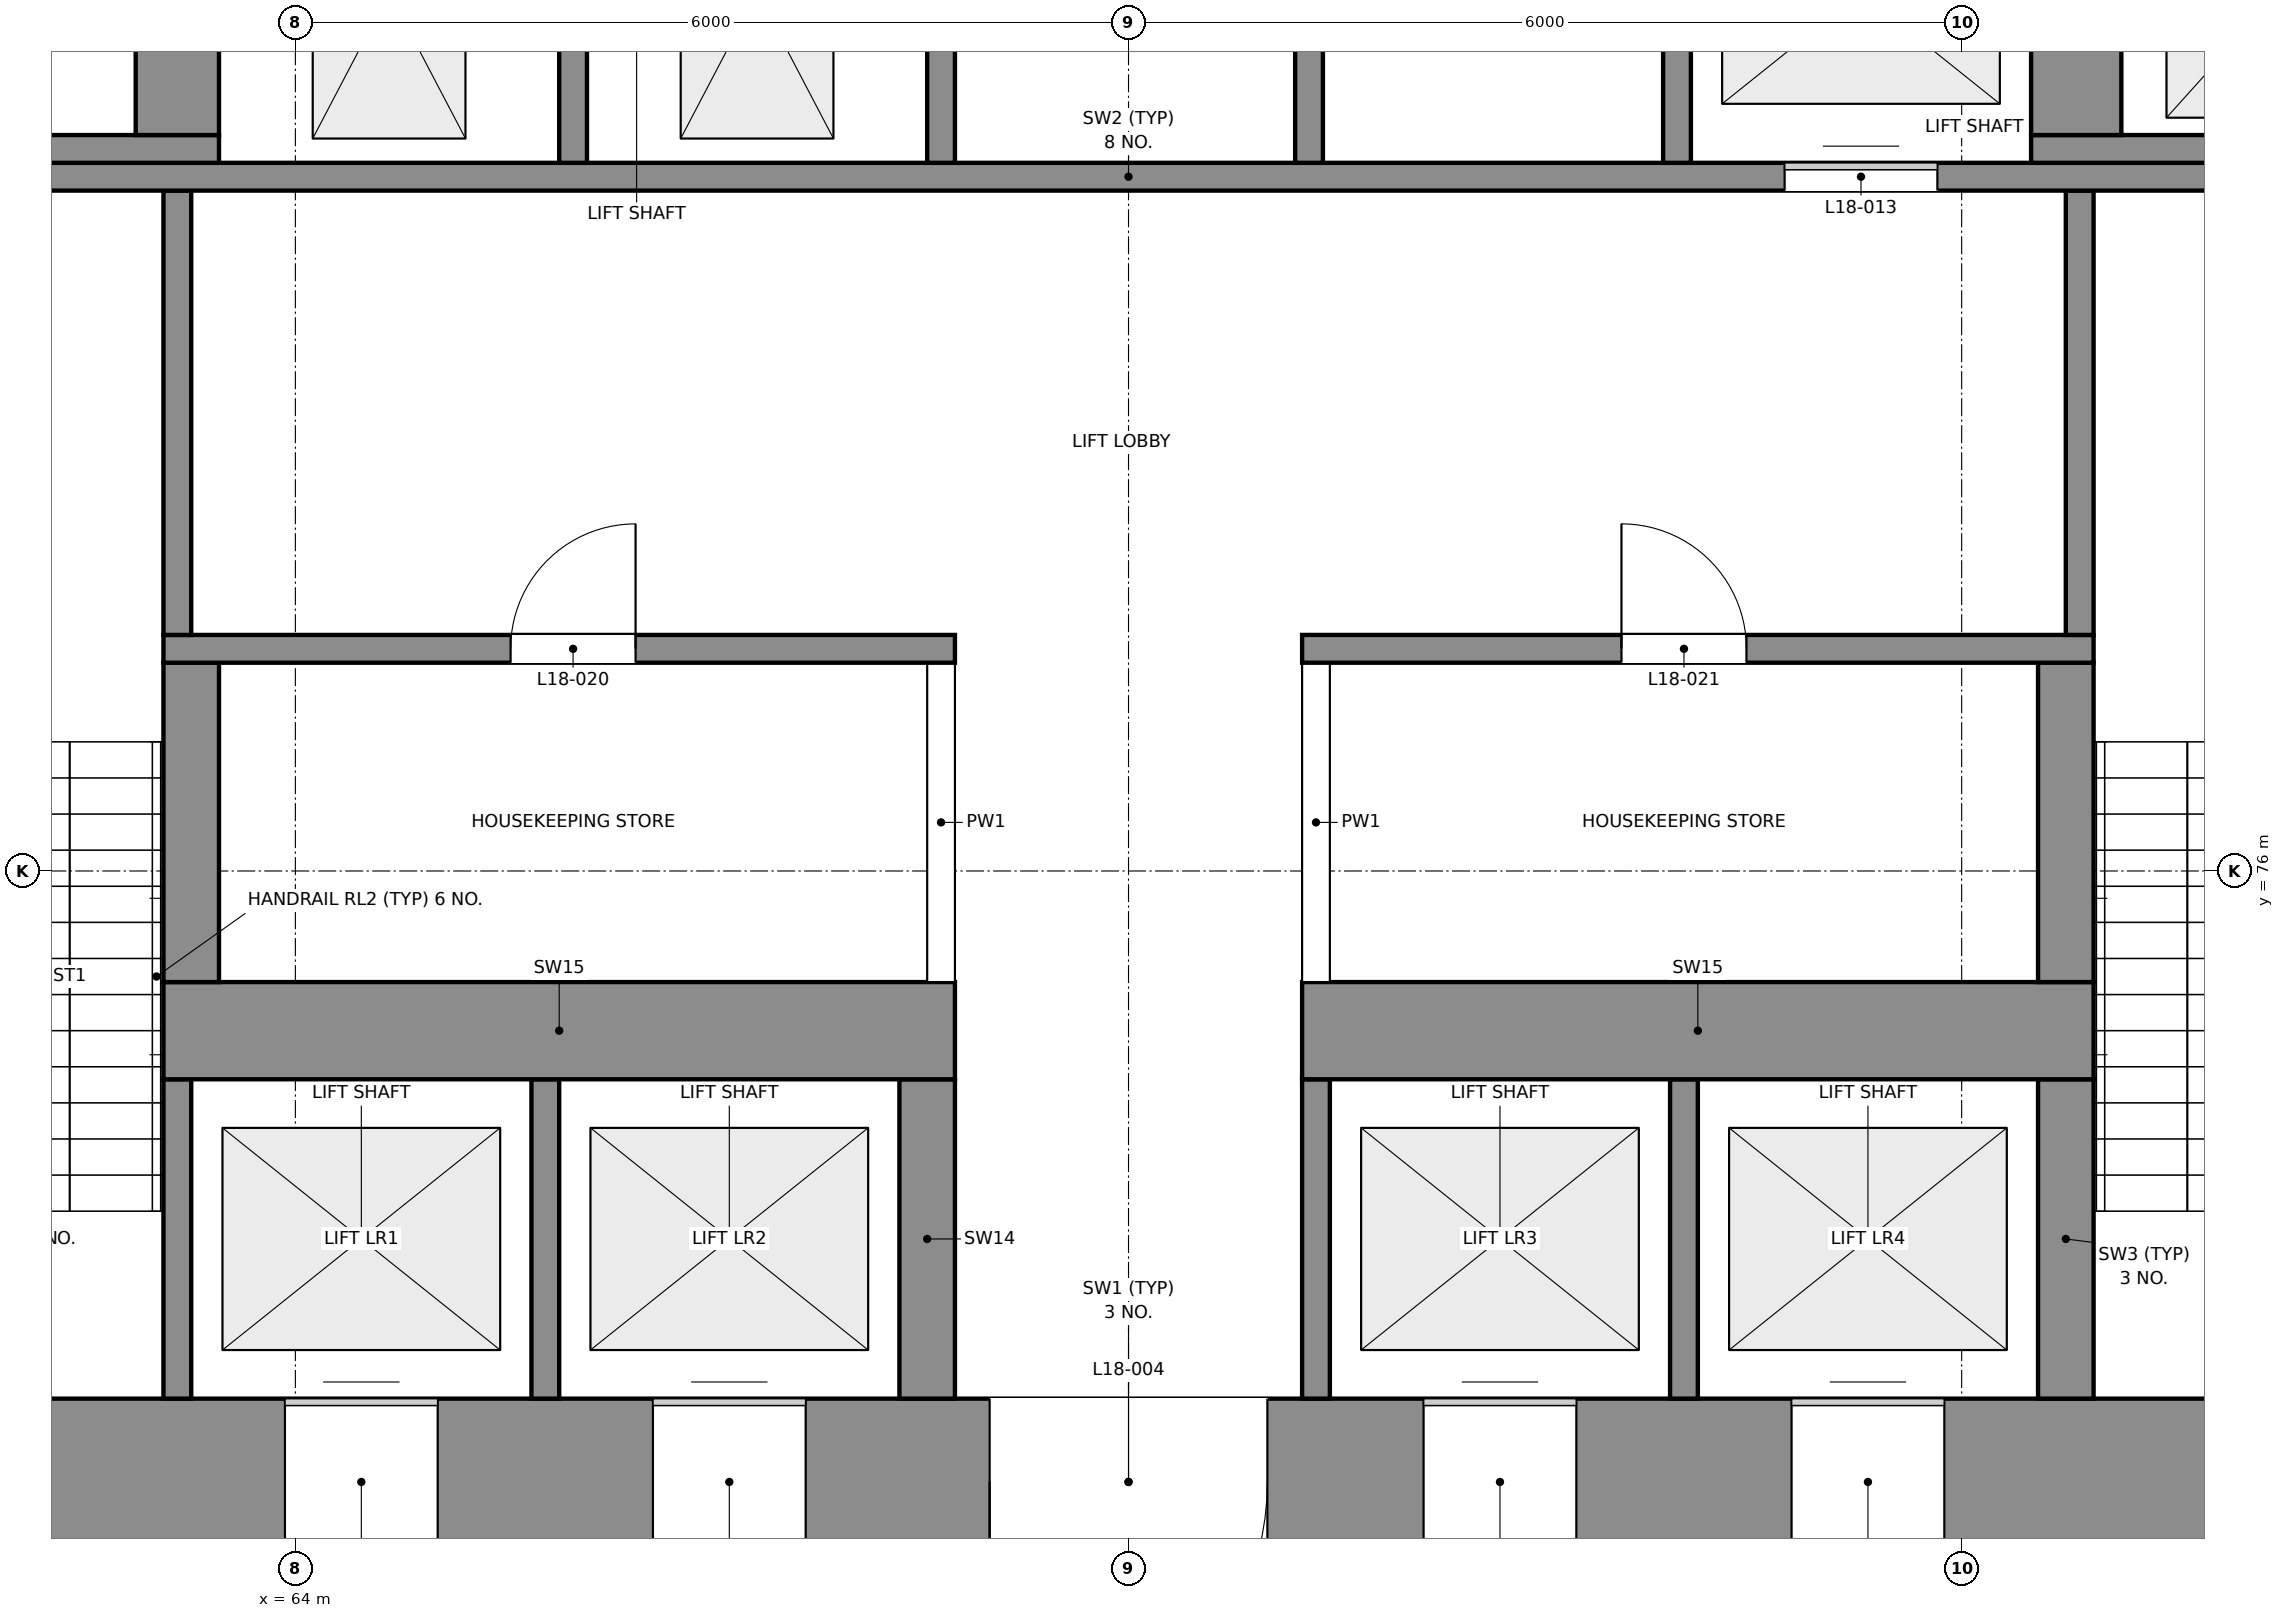
"""IFC4 building model, lengths in metres.
Left out: names, types, materials, properties, quantities, classifications, styles, units other than length and angle.
Written with IfcOpenShell. Run it as: python <this file> out.ifc"""

import sys

from ifc_helpers import new_model, si_unit, direction, frame, frame_2d, origin, place, context, subcontext, project, spatial, rectangle, extrude, element, fill, save


model = new_model("IFC4")
c1 = context("Model", 3, precision=1e-05, world=origin(), true_north=direction((0.0, 1.0)))
c2 = subcontext(c1, "Body", "Model", "MODEL_VIEW")
j1 = project(units=[si_unit("LENGTHUNIT", "METRE"), si_unit("PLANEANGLEUNIT", "RADIAN")], contexts=[c1])
p1 = place(None, origin())
s1 = spatial("IfcSite", under=j1, at=p1, CompositionType="ELEMENT")
p2 = place(p1, origin())
s2 = spatial("IfcBuilding", under=s1, at=p2, CompositionType="ELEMENT")
p3 = place(p2, frame((0.0, 0.0, 85.8)))
s3 = spatial("IfcBuildingStorey", under=s2, at=p3, CompositionType="ELEMENT", Elevation=85.8)
p4 = place(p3, frame((59.0, 71.6, 0.0), z_axis=(0.0, 0.0, 1.0), x_axis=(1.0, 0.0, 0.0)))
e1 = element("IfcWall", 1, at=p4, inside=s3, PredefinedType="SHEAR", context=c2, shape_type="SweptSolid", body=[
    extrude(rectangle(XDim=22.0, YDim=1.2, at=frame_2d((11.0, 0.0))), origin(), (0.0, 0.0, 1.0), 5.0),
])
p5 = place(p4, frame((2.025, 0.0, 0.0)))
e2 = element("IfcOpeningElement", 2, at=p5, cuts=e1, PredefinedType="OPENING", context=c2, shape_type="SweptSolid", body=[
    extrude(rectangle(XDim=1.2, YDim=2.1, at=frame_2d((0.6, 1.05))), frame((0.0, 0.61, 0.0), z_axis=(0.0, -1.0, 0.0), x_axis=(1.0, 0.0, 0.0)), (0.0, 0.0, 1.0), 1.22),
])
p6 = place(p4, frame((18.775, 0.0, 0.0)))
e3 = element("IfcOpeningElement", 3, at=p6, cuts=e1, PredefinedType="OPENING", context=c2, shape_type="SweptSolid", body=[
    extrude(rectangle(XDim=1.2, YDim=2.1, at=frame_2d((0.6, 1.05))), frame((0.0, 0.61, 0.0), z_axis=(0.0, -1.0, 0.0), x_axis=(1.0, 0.0, 0.0)), (0.0, 0.0, 1.0), 1.22),
])
p7 = place(p4, frame((10.0, 0.0, 0.0)))
e4 = element("IfcOpeningElement", 4, at=p7, cuts=e1, PredefinedType="OPENING", context=c2, shape_type="SweptSolid", body=[
    extrude(rectangle(XDim=2.0, YDim=2.1, at=frame_2d((1.0, 1.05))), frame((0.0, 0.61, 0.0), z_axis=(0.0, -1.0, 0.0), x_axis=(1.0, 0.0, 0.0)), (0.0, 0.0, 1.0), 1.22),
])
p8 = place(p4, frame((4.925, 0.0, 0.0)))
e5 = element("IfcOpeningElement", 5, at=p8, cuts=e1, PredefinedType="OPENING", context=c2, shape_type="SweptSolid", body=[
    extrude(rectangle(XDim=1.1, YDim=2.1, at=frame_2d((0.55, 1.05))), frame((0.0, 0.61, 0.0), z_axis=(0.0, -1.0, 0.0), x_axis=(1.0, 0.0, 0.0)), (0.0, 0.0, 1.0), 1.22),
])
p9 = place(p4, frame((7.575, 0.0, 0.0)))
e6 = element("IfcOpeningElement", 6, at=p9, cuts=e1, PredefinedType="OPENING", context=c2, shape_type="SweptSolid", body=[
    extrude(rectangle(XDim=1.1, YDim=2.1, at=frame_2d((0.55, 1.05))), frame((0.0, 0.61, 0.0), z_axis=(0.0, -1.0, 0.0), x_axis=(1.0, 0.0, 0.0)), (0.0, 0.0, 1.0), 1.22),
])
p10 = place(p4, frame((13.125, 0.0, 0.0)))
e7 = element("IfcOpeningElement", 7, at=p10, cuts=e1, PredefinedType="OPENING", context=c2, shape_type="SweptSolid", body=[
    extrude(rectangle(XDim=1.1, YDim=2.1, at=frame_2d((0.55, 1.05))), frame((0.0, 0.61, 0.0), z_axis=(0.0, -1.0, 0.0), x_axis=(1.0, 0.0, 0.0)), (0.0, 0.0, 1.0), 1.22),
])
p11 = place(p4, frame((15.775, 0.0, 0.0)))
e8 = element("IfcOpeningElement", 8, at=p11, cuts=e1, PredefinedType="OPENING", context=c2, shape_type="SweptSolid", body=[
    extrude(rectangle(XDim=1.1, YDim=2.1, at=frame_2d((0.55, 1.05))), frame((0.0, 0.61, 0.0), z_axis=(0.0, -1.0, 0.0), x_axis=(1.0, 0.0, 0.0)), (0.0, 0.0, 1.0), 1.22),
])
for number, where, z_axis, x_axis in (
    (9, (63.15, 72.2, 0.0), (0.0, 0.0, 1.0), (0.0, 1.0, 0.0)),
    (10, (65.8, 72.2, 0.0), (0.0, 0.0, 1.0), (0.0, 1.0, 0.0)),
):
    element("IfcWall", number, at=place(p3, frame(where, z_axis=z_axis, x_axis=x_axis)), inside=s3, PredefinedType="SHEAR", context=c2, shape_type="SweptSolid", body=[
        extrude(rectangle(XDim=2.3, YDim=0.2, at=frame_2d((1.15, 0.0))), origin(), (0.0, 0.0, 1.0), 5.0),
    ])
p12 = place(p3, frame((68.55, 72.2, 0.0), z_axis=(0.0, 0.0, 1.0), x_axis=(0.0, 1.0, 0.0)))
e11 = element("IfcWall", 11, at=p12, inside=s3, PredefinedType="SHEAR", context=c2, shape_type="SweptSolid", body=[
    extrude(rectangle(XDim=2.3, YDim=0.4, at=frame_2d((1.15, 0.0))), origin(), (0.0, 0.0, 1.0), 5.0),
])
for number, where, z_axis, x_axis in (
    (12, (71.35, 72.2, 0.0), (0.0, 0.0, 1.0), (0.0, 1.0, 0.0)),
    (13, (74.0, 72.2, 0.0), (0.0, 0.0, 1.0), (0.0, 1.0, 0.0)),
):
    element("IfcWall", number, at=place(p3, frame(where, z_axis=z_axis, x_axis=x_axis)), inside=s3, PredefinedType="SHEAR", context=c2, shape_type="SweptSolid", body=[
        extrude(rectangle(XDim=2.3, YDim=0.2, at=frame_2d((1.15, 0.0))), origin(), (0.0, 0.0, 1.0), 5.0),
    ])
p13 = place(p3, frame((76.75, 72.2, 0.0), z_axis=(0.0, 0.0, 1.0), x_axis=(0.0, 1.0, 0.0)))
e14 = element("IfcWall", 14, at=p13, inside=s3, PredefinedType="SHEAR", context=c2, shape_type="SweptSolid", body=[
    extrude(rectangle(XDim=2.3, YDim=0.4, at=frame_2d((1.15, 0.0))), origin(), (0.0, 0.0, 1.0), 5.0),
])
for number, where, z_axis, x_axis in (
    (15, (63.05, 74.85, 0.0), (0.0, 0.0, 1.0), (1.0, 0.0, 0.0)),
    (16, (71.25, 74.85, 0.0), (0.0, 0.0, 1.0), (1.0, 0.0, 0.0)),
):
    element("IfcWall", number, at=place(p3, frame(where, z_axis=z_axis, x_axis=x_axis)), inside=s3, PredefinedType="SHEAR", context=c2, shape_type="SweptSolid", body=[
        extrude(rectangle(XDim=5.7, YDim=0.7, at=frame_2d((2.85, 0.0))), origin(), (0.0, 0.0, 1.0), 5.0),
    ])
p14 = place(p3, frame((63.25, 75.2, 0.0), z_axis=(0.0, 0.0, 1.0), x_axis=(0.0, 1.0, 0.0)))
e17 = element("IfcWall", 17, at=p14, inside=s3, PredefinedType="SHEAR", context=c2, shape_type="SweptSolid", body=[
    extrude(rectangle(XDim=2.3, YDim=0.4, at=frame_2d((1.15, 0.0))), origin(), (0.0, 0.0, 1.0), 5.0),
])
for number, where, z_axis, x_axis in (
    (18, (68.65, 75.2, 0.0), (0.0, 0.0, 1.0), (0.0, 1.0, 0.0)),
    (19, (71.35, 75.2, 0.0), (0.0, 0.0, 1.0), (0.0, 1.0, 0.0)),
):
    element("IfcWall", number, at=place(p3, frame(where, z_axis=z_axis, x_axis=x_axis)), inside=s3, PredefinedType="PARTITIONING", context=c2, shape_type="SweptSolid", body=[
        extrude(rectangle(XDim=2.3, YDim=0.2, at=frame_2d((1.15, 0.0))), origin(), (0.0, 0.0, 1.0), 4.7),
    ])
p15 = place(p3, frame((76.75, 75.2, 0.0), z_axis=(0.0, 0.0, 1.0), x_axis=(0.0, 1.0, 0.0)))
e20 = element("IfcWall", 20, at=p15, inside=s3, PredefinedType="SHEAR", context=c2, shape_type="SweptSolid", body=[
    extrude(rectangle(XDim=2.3, YDim=0.4, at=frame_2d((1.15, 0.0))), origin(), (0.0, 0.0, 1.0), 5.0),
])
p16 = place(p3, frame((63.05, 77.6, 0.0), z_axis=(0.0, 0.0, 1.0), x_axis=(1.0, 0.0, 0.0)))
e21 = element("IfcWall", 21, at=p16, inside=s3, PredefinedType="SHEAR", context=c2, shape_type="SweptSolid", body=[
    extrude(rectangle(XDim=5.7, YDim=0.2, at=frame_2d((2.85, 0.0))), origin(), (0.0, 0.0, 1.0), 5.0),
])
p17 = place(p16, frame((2.5, 0.0, 0.0)))
e22 = element("IfcOpeningElement", 22, at=p17, cuts=e21, PredefinedType="OPENING", context=c2, shape_type="SweptSolid", body=[
    extrude(rectangle(XDim=0.9, YDim=2.1, at=frame_2d((0.45, 1.05))), frame((0.0, 0.11, 0.0), z_axis=(0.0, -1.0, 0.0), x_axis=(1.0, 0.0, 0.0)), (0.0, 0.0, 1.0), 0.22),
])
p18 = place(p3, frame((71.25, 77.6, 0.0), z_axis=(0.0, 0.0, 1.0), x_axis=(1.0, 0.0, 0.0)))
e23 = element("IfcWall", 23, at=p18, inside=s3, PredefinedType="SHEAR", context=c2, shape_type="SweptSolid", body=[
    extrude(rectangle(XDim=5.7, YDim=0.2, at=frame_2d((2.85, 0.0))), origin(), (0.0, 0.0, 1.0), 5.0),
])
p19 = place(p18, frame((2.3, 0.0, 0.0)))
e24 = element("IfcOpeningElement", 24, at=p19, cuts=e23, PredefinedType="OPENING", context=c2, shape_type="SweptSolid", body=[
    extrude(rectangle(XDim=0.9, YDim=2.1, at=frame_2d((0.45, 1.05))), frame((0.0, 0.11, 0.0), z_axis=(0.0, -1.0, 0.0), x_axis=(1.0, 0.0, 0.0)), (0.0, 0.0, 1.0), 0.22),
])
for number, where, z_axis, x_axis in (
    (25, (63.15, 77.7, 0.0), (0.0, 0.0, 1.0), (0.0, 1.0, 0.0)),
    (26, (76.85, 77.7, 0.0), (0.0, 0.0, 1.0), (0.0, 1.0, 0.0)),
):
    element("IfcWall", number, at=place(p3, frame(where, z_axis=z_axis, x_axis=x_axis)), inside=s3, PredefinedType="SHEAR", context=c2, shape_type="SweptSolid", body=[
        extrude(rectangle(XDim=3.2, YDim=0.2, at=frame_2d((1.6, 0.0))), origin(), (0.0, 0.0, 1.0), 5.0),
    ])
p20 = place(p3, frame((59.0, 81.0, 0.0), z_axis=(0.0, 0.0, 1.0), x_axis=(1.0, 0.0, 0.0)))
e27 = element("IfcWall", 27, at=p20, inside=s3, PredefinedType="SHEAR", context=c2, shape_type="SweptSolid", body=[
    extrude(rectangle(XDim=22.0, YDim=0.2, at=frame_2d((11.0, 0.0))), origin(), (0.0, 0.0, 1.0), 5.0),
])
p21 = place(p20, frame((15.725, 0.0, 0.0)))
e28 = element("IfcOpeningElement", 28, at=p21, cuts=e27, PredefinedType="OPENING", context=c2, shape_type="SweptSolid", body=[
    extrude(rectangle(XDim=1.1, YDim=2.1, at=frame_2d((0.55, 1.05))), frame((0.0, 0.11, 0.0), z_axis=(0.0, -1.0, 0.0), x_axis=(1.0, 0.0, 0.0)), (0.0, 0.0, 1.0), 0.22),
])
p22 = place(p3, frame((59.0, 81.2, 0.0), z_axis=(0.0, 0.0, 1.0), x_axis=(1.0, 0.0, 0.0)))
e29 = element("IfcWall", 29, at=p22, inside=s3, PredefinedType="SHEAR", context=c2, shape_type="SweptSolid", body=[
    extrude(rectangle(XDim=4.45, YDim=0.2, at=frame_2d((2.225, 0.0))), origin(), (0.0, 0.0, 1.0), 5.0),
])
for number, where, z_axis, x_axis in (
    (30, (66.0, 81.1, 0.0), (0.0, 0.0, 1.0), (0.0, 1.0, 0.0)),
    (31, (68.65, 81.1, 0.0), (0.0, 0.0, 1.0), (0.0, 1.0, 0.0)),
    (32, (71.3, 81.1, 0.0), (0.0, 0.0, 1.0), (0.0, 1.0, 0.0)),
    (33, (73.95, 81.1, 0.0), (0.0, 0.0, 1.0), (0.0, 1.0, 0.0)),
):
    element("IfcWall", number, at=place(p3, frame(where, z_axis=z_axis, x_axis=x_axis)), inside=s3, PredefinedType="SHEAR", context=c2, shape_type="SweptSolid", body=[
        extrude(rectangle(XDim=2.45, YDim=0.2, at=frame_2d((1.225, 0.0))), origin(), (0.0, 0.0, 1.0), 5.0),
    ])
p23 = place(p3, frame((76.5, 81.2, 0.0), z_axis=(0.0, 0.0, 1.0), x_axis=(1.0, 0.0, 0.0)))
e34 = element("IfcWall", 34, at=p23, inside=s3, PredefinedType="SHEAR", context=c2, shape_type="SweptSolid", body=[
    extrude(rectangle(XDim=4.5, YDim=0.2, at=frame_2d((2.25, 0.0))), origin(), (0.0, 0.0, 1.0), 5.0),
])
p24 = place(p3, frame((63.15, 81.3, 0.0), z_axis=(0.0, 0.0, 1.0), x_axis=(0.0, 1.0, 0.0)))
e35 = element("IfcWall", 35, at=p24, inside=s3, PredefinedType="SHEAR", context=c2, shape_type="SweptSolid", body=[
    extrude(rectangle(XDim=2.25, YDim=0.6, at=frame_2d((1.125, 0.0))), origin(), (0.0, 0.0, 1.0), 5.0),
])
p25 = place(p3, frame((76.825, 81.3, 0.0), z_axis=(0.0, 0.0, 1.0), x_axis=(0.0, 1.0, 0.0)))
e36 = element("IfcWall", 36, at=p25, inside=s3, PredefinedType="SHEAR", context=c2, shape_type="SweptSolid", body=[
    extrude(rectangle(XDim=2.25, YDim=0.65, at=frame_2d((1.125, 0.0))), origin(), (0.0, 0.0, 1.0), 5.0),
])
p26 = place(p7, frame((2.0, 0.0, 0.0), z_axis=(0.0, 0.0, 1.0), x_axis=(-1.0, 0.0, 0.0)))
e37 = element("IfcDoor", 37, at=p26, inside=s3, OperationType="DOUBLE_DOOR_SINGLE_SWING", PredefinedType="DOOR", context=c2, shape_type="SweptSolid", body=[
    extrude(rectangle(XDim=2.0, YDim=2.1, at=frame_2d((1.0, 1.05))), frame((0.0, 0.025, 0.0), z_axis=(0.0, -1.0, 0.0), x_axis=(1.0, 0.0, 0.0)), (0.0, 0.0, 1.0), 0.05),
])
fill(e4, e37)
p27 = place(p21, origin())
e38 = element("IfcDoor", 38, at=p27, inside=s3, OperationType="DOUBLE_DOOR_SLIDING", PredefinedType="DOOR", context=c2, shape_type="SweptSolid", body=[
    extrude(rectangle(XDim=1.1, YDim=2.1, at=frame_2d((0.55, 1.05))), frame((0.0, 0.025, 0.0), z_axis=(0.0, -1.0, 0.0), x_axis=(1.0, 0.0, 0.0)), (0.0, 0.0, 1.0), 0.05),
])
fill(e28, e38)
p28 = place(p8, origin())
e39 = element("IfcDoor", 39, at=p28, inside=s3, OperationType="DOUBLE_DOOR_SLIDING", PredefinedType="DOOR", context=c2, shape_type="SweptSolid", body=[
    extrude(rectangle(XDim=1.1, YDim=2.1, at=frame_2d((0.55, 1.05))), frame((0.0, 0.025, 0.0), z_axis=(0.0, -1.0, 0.0), x_axis=(1.0, 0.0, 0.0)), (0.0, 0.0, 1.0), 0.05),
])
fill(e5, e39)
p29 = place(p9, origin())
e40 = element("IfcDoor", 40, at=p29, inside=s3, OperationType="DOUBLE_DOOR_SLIDING", PredefinedType="DOOR", context=c2, shape_type="SweptSolid", body=[
    extrude(rectangle(XDim=1.1, YDim=2.1, at=frame_2d((0.55, 1.05))), frame((0.0, 0.025, 0.0), z_axis=(0.0, -1.0, 0.0), x_axis=(1.0, 0.0, 0.0)), (0.0, 0.0, 1.0), 0.05),
])
fill(e6, e40)
p30 = place(p10, origin())
e41 = element("IfcDoor", 41, at=p30, inside=s3, OperationType="DOUBLE_DOOR_SLIDING", PredefinedType="DOOR", context=c2, shape_type="SweptSolid", body=[
    extrude(rectangle(XDim=1.1, YDim=2.1, at=frame_2d((0.55, 1.05))), frame((0.0, 0.025, 0.0), z_axis=(0.0, -1.0, 0.0), x_axis=(1.0, 0.0, 0.0)), (0.0, 0.0, 1.0), 0.05),
])
fill(e7, e41)
p31 = place(p11, origin())
e42 = element("IfcDoor", 42, at=p31, inside=s3, OperationType="DOUBLE_DOOR_SLIDING", PredefinedType="DOOR", context=c2, shape_type="SweptSolid", body=[
    extrude(rectangle(XDim=1.1, YDim=2.1, at=frame_2d((0.55, 1.05))), frame((0.0, 0.025, 0.0), z_axis=(0.0, -1.0, 0.0), x_axis=(1.0, 0.0, 0.0)), (0.0, 0.0, 1.0), 0.05),
])
fill(e8, e42)
p32 = place(p17, origin())
e43 = element("IfcDoor", 43, at=p32, inside=s3, OperationType="SINGLE_SWING_RIGHT", PredefinedType="DOOR", context=c2, shape_type="SweptSolid", body=[
    extrude(rectangle(XDim=0.9, YDim=2.1, at=frame_2d((0.45, 1.05))), frame((0.0, 0.025, 0.0), z_axis=(0.0, -1.0, 0.0), x_axis=(1.0, 0.0, 0.0)), (0.0, 0.0, 1.0), 0.05),
])
fill(e22, e43)
p33 = place(p19, origin())
e44 = element("IfcDoor", 44, at=p33, inside=s3, OperationType="SINGLE_SWING_LEFT", PredefinedType="DOOR", context=c2, shape_type="SweptSolid", body=[
    extrude(rectangle(XDim=0.9, YDim=2.1, at=frame_2d((0.45, 1.05))), frame((0.0, 0.025, 0.0), z_axis=(0.0, -1.0, 0.0), x_axis=(1.0, 0.0, 0.0)), (0.0, 0.0, 1.0), 0.05),
])
fill(e24, e44)
save(model, sys.argv[1])
